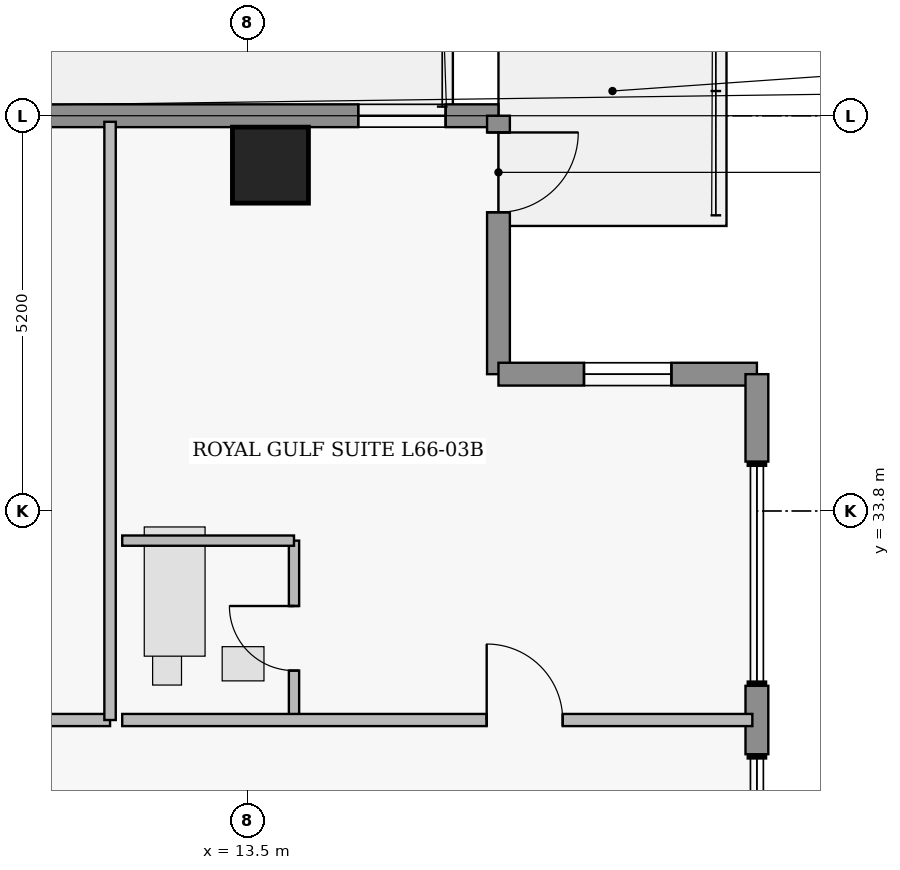
"""IFC4 building model, lengths in metres.
Left out: names, types, materials, properties, quantities, classifications, styles, units other than length and angle.
Written with IfcOpenShell. Run it as: python <this file> out.ifc"""

import sys

from ifc_helpers import new_model, si_unit, direction, frame, frame_2d, origin, origin_2d, place, context, subcontext, project, spatial, rectangle, extrude, element, fill, save


model = new_model("IFC4")
c1 = context("Model", 3, precision=1e-05, world=origin(), true_north=direction((0.0, 1.0)))
c2 = subcontext(c1, "Body", "Model", "MODEL_VIEW")
j1 = project(units=[si_unit("LENGTHUNIT", "METRE"), si_unit("PLANEANGLEUNIT", "RADIAN")], contexts=[c1])
p1 = place(None, origin())
s1 = spatial("IfcSite", under=j1, at=p1, CompositionType="ELEMENT")
p2 = place(p1, origin())
s2 = spatial("IfcBuilding", under=s1, at=p2, CompositionType="ELEMENT")
p3 = place(p2, frame((0.0, 0.0, 261.85)))
s3 = spatial("IfcBuildingStorey", under=s2, at=p3, CompositionType="ELEMENT", Elevation=261.85)
p4 = place(p3, frame((13.8, 38.35, 0.0), z_axis=(0.0, 0.0, 1.0), x_axis=(1.0, 0.0, 0.0)))
e1 = element("IfcColumn", 1, at=p4, inside=s3, PredefinedType="COLUMN", context=c2, shape_type="SweptSolid", body=[
    extrude(rectangle(XDim=1.0, YDim=1.0, at=origin_2d()), origin(), (0.0, 0.0, 1.0), 3.7),
])
p5 = place(p3, frame((7.878, 39.0, 0.0), z_axis=(0.0, 0.0, 1.0), x_axis=(1.0, 0.0, 0.0)))
e2 = element("IfcWall", 2, at=p5, inside=s3, PredefinedType="STANDARD", context=c2, shape_type="SweptSolid", body=[
    extrude(rectangle(XDim=8.922, YDim=0.3, at=frame_2d((4.461, 0.0))), origin(), (0.0, 0.0, 1.0), 3.48),
])
p6 = place(p5, frame((0.65, 0.0, 0.0)))
e3 = element("IfcOpeningElement", 3, at=p6, cuts=e2, PredefinedType="OPENING", context=c2, shape_type="SweptSolid", body=[
    extrude(rectangle(XDim=1.35, YDim=2.3, at=frame_2d((0.675, 1.15))), frame((0.0, 0.16, 0.0), z_axis=(0.0, -1.0, 0.0), x_axis=(1.0, 0.0, 0.0)), (0.0, 0.0, 1.0), 0.32),
])
p7 = place(p5, frame((7.077, 0.0, 0.95)))
e4 = element("IfcOpeningElement", 4, at=p7, cuts=e2, PredefinedType="OPENING", context=c2, shape_type="SweptSolid", body=[
    extrude(rectangle(XDim=1.15, YDim=1.55, at=frame_2d((0.575, 0.775))), frame((0.0, 0.16, 0.0), z_axis=(0.0, -1.0, 0.0), x_axis=(1.0, 0.0, 0.0)), (0.0, 0.0, 1.0), 0.32),
])
p8 = place(p3, frame((16.8, 39.0, 0.0), z_axis=(0.0, 0.0, 1.0), x_axis=(0.0, -1.0, 0.0)))
e5 = element("IfcWall", 5, at=p8, inside=s3, PredefinedType="STANDARD", context=c2, shape_type="SweptSolid", body=[
    extrude(rectangle(XDim=3.4, YDim=0.3, at=frame_2d((1.7, 0.0))), origin(), (0.0, 0.0, 1.0), 3.48),
])
p9 = place(p8, frame((0.22, 0.0, 0.0)))
e6 = element("IfcOpeningElement", 6, at=p9, cuts=e5, PredefinedType="OPENING", context=c2, shape_type="SweptSolid", body=[
    extrude(rectangle(XDim=1.05, YDim=2.2, at=frame_2d((0.525, 1.1))), frame((0.0, 0.16, 0.0), z_axis=(0.0, -1.0, 0.0), x_axis=(1.0, 0.0, 0.0)), (0.0, 0.0, 1.0), 0.32),
])
p10 = place(p3, frame((16.8, 35.6, 0.0), z_axis=(0.0, 0.0, 1.0), x_axis=(1.0, 0.0, 0.0)))
e7 = element("IfcWall", 7, at=p10, inside=s3, PredefinedType="STANDARD", context=c2, shape_type="SweptSolid", body=[
    extrude(rectangle(XDim=3.4, YDim=0.3, at=frame_2d((1.7, 0.0))), origin(), (0.0, 0.0, 1.0), 3.48),
])
p11 = place(p10, frame((1.125, 0.0, 1.25)))
e8 = element("IfcOpeningElement", 8, at=p11, cuts=e7, PredefinedType="OPENING", context=c2, shape_type="SweptSolid", body=[
    extrude(rectangle(XDim=1.15, YDim=1.55, at=frame_2d((0.575, 0.775))), frame((0.0, 0.16, 0.0), z_axis=(0.0, -1.0, 0.0), x_axis=(1.0, 0.0, 0.0)), (0.0, 0.0, 1.0), 0.32),
])
p12 = place(p3, frame((20.2, 35.6, 0.0), z_axis=(0.0, 0.0, 1.0), x_axis=(0.0, -1.0, 0.0)))
e9 = element("IfcWall", 9, at=p12, inside=s3, PredefinedType="STANDARD", context=c2, shape_type="SweptSolid", body=[
    extrude(rectangle(XDim=1.15, YDim=0.3, at=frame_2d((0.575, 0.0))), origin(), (0.0, 0.0, 1.0), 3.48),
])
p13 = place(p3, frame((20.2, 31.5, 0.0), z_axis=(0.0, 0.0, 1.0), x_axis=(0.0, -1.0, 0.0)))
e10 = element("IfcWall", 10, at=p13, inside=s3, PredefinedType="STANDARD", context=c2, shape_type="SweptSolid", body=[
    extrude(rectangle(XDim=0.9, YDim=0.3, at=frame_2d((0.45, 0.0))), origin(), (0.0, 0.0, 1.0), 3.48),
])
p14 = place(p3, frame((3.4, 31.05, 0.0), z_axis=(0.0, 0.0, 1.0), x_axis=(1.0, 0.0, 0.0)))
e11 = element("IfcWall", 11, at=p14, inside=s3, PredefinedType="PARTITIONING", context=c2, shape_type="SweptSolid", body=[
    extrude(rectangle(XDim=8.29, YDim=0.16, at=frame_2d((4.145, 0.0))), origin(), (0.0, 0.0, 1.0), 3.48),
])
p15 = place(p14, frame((4.795, 0.0, 0.0)))
e12 = element("IfcOpeningElement", 12, at=p15, cuts=e11, PredefinedType="OPENING", context=c2, shape_type="SweptSolid", body=[
    extrude(rectangle(XDim=1.0, YDim=2.15, at=frame_2d((0.5, 1.075))), frame((0.0, 0.09, 0.0), z_axis=(0.0, -1.0, 0.0), x_axis=(1.0, 0.0, 0.0)), (0.0, 0.0, 1.0), 0.18),
])
p16 = place(p3, frame((14.11, 31.05, 0.0), z_axis=(0.0, 0.0, 1.0), x_axis=(0.0, 1.0, 0.0)))
e13 = element("IfcWall", 13, at=p16, inside=s3, PredefinedType="PLUMBINGWALL", context=c2, shape_type="SweptSolid", body=[
    extrude(rectangle(XDim=2.36, YDim=0.135, at=frame_2d((1.18, 0.0))), origin(), (0.0, 0.0, 1.0), 2.362),
])
p17 = place(p16, frame((0.65, 0.0, 0.0)))
e14 = element("IfcOpeningElement", 14, at=p17, cuts=e13, PredefinedType="OPENING", context=c2, shape_type="SweptSolid", body=[
    extrude(rectangle(XDim=0.85, YDim=2.1, at=frame_2d((0.425, 1.05))), frame((0.0, 0.077, 0.0), z_axis=(0.0, -1.0, 0.0), x_axis=(1.0, 0.0, 0.0)), (0.0, 0.0, 1.0), 0.155),
])
p18 = place(p3, frame((11.85, 31.05, 0.0), z_axis=(0.0, 0.0, 1.0), x_axis=(1.0, 0.0, 0.0)))
e15 = element("IfcWall", 15, at=p18, inside=s3, PredefinedType="PARTITIONING", context=c2, shape_type="SweptSolid", body=[
    extrude(rectangle(XDim=8.29, YDim=0.16, at=frame_2d((4.145, 0.0))), origin(), (0.0, 0.0, 1.0), 3.48),
])
p19 = place(p18, frame((4.795, 0.0, 0.0)))
e16 = element("IfcOpeningElement", 16, at=p19, cuts=e15, PredefinedType="OPENING", context=c2, shape_type="SweptSolid", body=[
    extrude(rectangle(XDim=1.0, YDim=2.15, at=frame_2d((0.5, 1.075))), frame((0.0, 0.09, 0.0), z_axis=(0.0, -1.0, 0.0), x_axis=(1.0, 0.0, 0.0)), (0.0, 0.0, 1.0), 0.18),
])
p20 = place(p3, frame((11.69, 31.05, 0.0), z_axis=(0.0, 0.0, 1.0), x_axis=(0.0, 1.0, 0.0)))
e17 = element("IfcWall", 17, at=p20, inside=s3, PredefinedType="PARTITIONING", context=c2, shape_type="SweptSolid", body=[
    extrude(rectangle(XDim=7.87, YDim=0.15, at=frame_2d((3.935, 0.0))), origin(), (0.0, 0.0, 1.0), 3.48),
])
p21 = place(p3, frame((11.85, 33.41, 0.0), z_axis=(0.0, 0.0, 1.0), x_axis=(1.0, 0.0, 0.0)))
e18 = element("IfcWall", 18, at=p21, inside=s3, PredefinedType="PLUMBINGWALL", context=c2, shape_type="SweptSolid", body=[
    extrude(rectangle(XDim=2.26, YDim=0.135, at=frame_2d((1.13, 0.0))), origin(), (0.0, 0.0, 1.0), 3.076),
])
p22 = place(p7, origin())
e19 = element("IfcWindow", 19, at=p22, inside=s3, PartitioningType="SINGLE_PANEL", PredefinedType="WINDOW", context=c2, shape_type="SweptSolid", body=[
    extrude(rectangle(XDim=1.15, YDim=1.55, at=frame_2d((0.575, 0.775))), frame((0.0, 0.03, 0.0), z_axis=(0.0, -1.0, 0.0), x_axis=(1.0, 0.0, 0.0)), (0.0, 0.0, 1.0), 0.06),
])
fill(e4, e19)
p23 = place(p9, origin())
e20 = element("IfcDoor", 20, at=p23, inside=s3, OperationType="SINGLE_SWING_LEFT", PredefinedType="DOOR", context=c2, shape_type="SweptSolid", body=[
    extrude(rectangle(XDim=1.05, YDim=2.2, at=frame_2d((0.525, 1.1))), frame((0.0, 0.025, 0.0), z_axis=(0.0, -1.0, 0.0), x_axis=(1.0, 0.0, 0.0)), (0.0, 0.0, 1.0), 0.05),
])
fill(e6, e20)
p24 = place(p11, origin())
e21 = element("IfcWindow", 21, at=p24, inside=s3, PartitioningType="SINGLE_PANEL", PredefinedType="WINDOW", context=c2, shape_type="SweptSolid", body=[
    extrude(rectangle(XDim=1.15, YDim=1.55, at=frame_2d((0.575, 0.775))), frame((0.0, 0.03, 0.0), z_axis=(0.0, -1.0, 0.0), x_axis=(1.0, 0.0, 0.0)), (0.0, 0.0, 1.0), 0.06),
])
fill(e8, e21)
p25 = place(p17, origin())
e22 = element("IfcDoor", 22, at=p25, inside=s3, OperationType="SINGLE_SWING_RIGHT", PredefinedType="DOOR", context=c2, shape_type="SweptSolid", body=[
    extrude(rectangle(XDim=0.85, YDim=2.1, at=frame_2d((0.425, 1.05))), frame((0.0, 0.025, 0.0), z_axis=(0.0, -1.0, 0.0), x_axis=(1.0, 0.0, 0.0)), (0.0, 0.0, 1.0), 0.05),
])
fill(e14, e22)
p26 = place(p19, origin())
e23 = element("IfcDoor", 23, at=p26, inside=s3, OperationType="SINGLE_SWING_LEFT", PredefinedType="DOOR", context=c2, shape_type="SweptSolid", body=[
    extrude(rectangle(XDim=1.0, YDim=2.15, at=frame_2d((0.5, 1.075))), frame((0.0, 0.025, 0.0), z_axis=(0.0, -1.0, 0.0), x_axis=(1.0, 0.0, 0.0)), (0.0, 0.0, 1.0), 0.05),
])
fill(e16, e23)
save(model, sys.argv[1])
